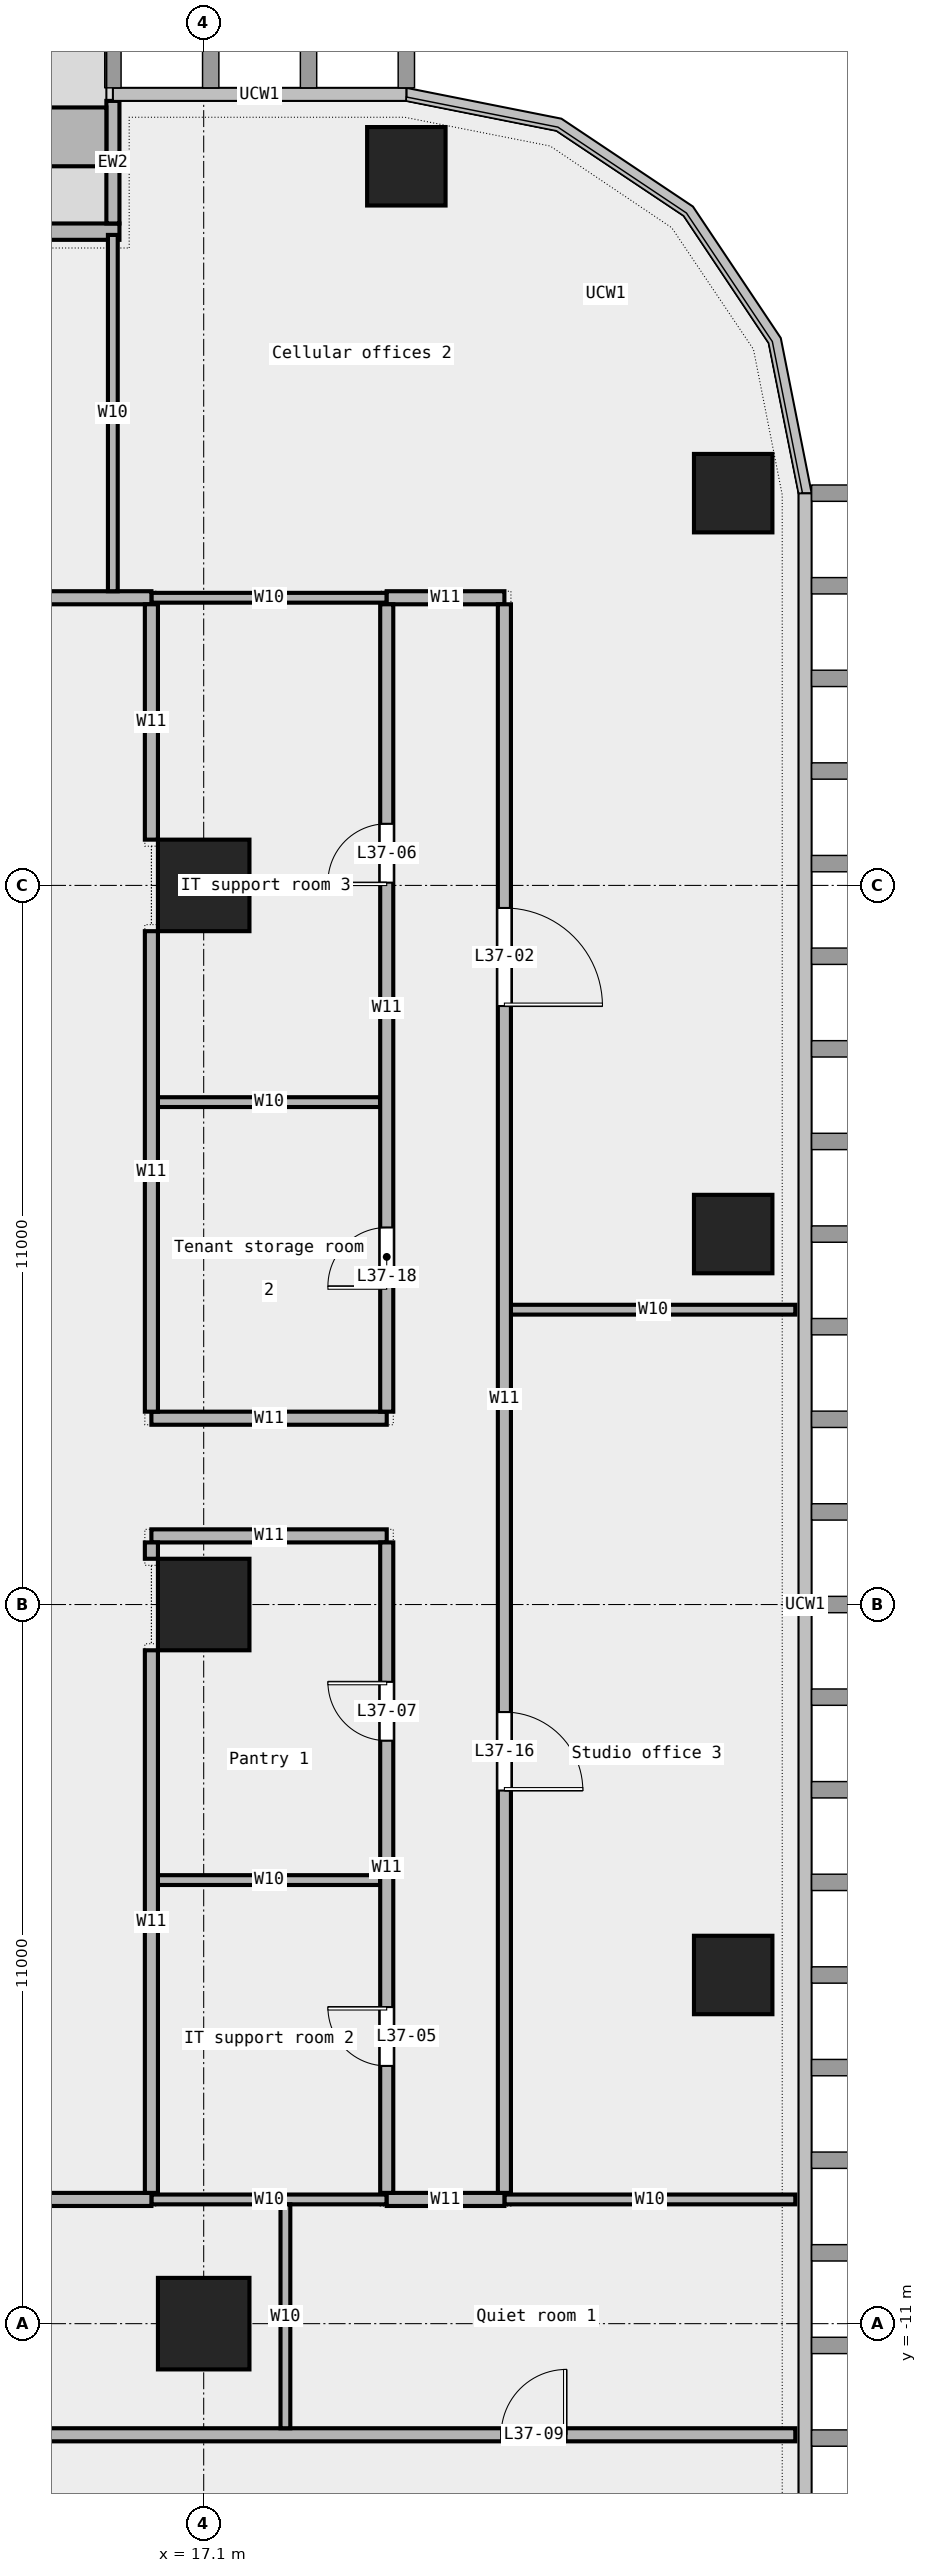
"""IFC4 building model, lengths in metres.
Left out: names, types, materials, properties, quantities, classifications, styles, units other than length and angle.
Written with IfcOpenShell. Run it as: python <this file> out.ifc"""

import sys

from ifc_helpers import new_model, si_unit, direction, frame, frame_2d, origin, origin_2d, place, context, subcontext, project, spatial, rectangle, extrude, element, fill, save


model = new_model("IFC4")
c1 = context("Model", 3, precision=1e-05, world=origin(), true_north=direction((0.0, 1.0)))
c2 = subcontext(c1, "Body", "Model", "MODEL_VIEW")
j1 = project(units=[si_unit("LENGTHUNIT", "METRE"), si_unit("PLANEANGLEUNIT", "RADIAN")], contexts=[c1])
p1 = place(None, origin())
s1 = spatial("IfcSite", under=j1, at=p1, CompositionType="ELEMENT")
p2 = place(p1, origin())
s2 = spatial("IfcBuilding", under=s1, at=p2, CompositionType="ELEMENT")
p3 = place(p2, frame((0.0, 0.0, 181.0)))
s3 = spatial("IfcBuildingStorey", under=s2, at=p3, CompositionType="ELEMENT", Elevation=181.0)
for number, where, z_axis, x_axis in (
    (1, (25.2, -5.667, 0.0), (0.0, 0.0, 1.0), (1.0, 0.0, 0.0)),
    (2, (25.2, 5.667, 0.0), (0.0, 0.0, 1.0), (1.0, 0.0, 0.0)),
    (3, (25.2, 17.0, 0.0), (0.0, 0.0, 1.0), (1.0, 0.0, 0.0)),
    (4, (20.2, 22.0, 0.0), (0.0, 0.0, 1.0), (1.0, 0.0, 0.0)),
):
    element("IfcColumn", number, at=place(p3, frame(where, z_axis=z_axis, x_axis=x_axis)), inside=s3, PredefinedType="COLUMN", context=c2, shape_type="SweptSolid", body=[
        extrude(rectangle(XDim=1.2, YDim=1.2, at=origin_2d()), origin(), (0.0, 0.0, 1.0), 3.6),
    ])
for number, where, z_axis, x_axis in (
    (5, (17.1, -11.0, 0.0), (0.0, 0.0, 1.0), (1.0, 0.0, 0.0)),
    (6, (17.1, 0.0, 0.0), (0.0, 0.0, 1.0), (1.0, 0.0, 0.0)),
    (7, (17.1, 11.0, 0.0), (0.0, 0.0, 1.0), (1.0, 0.0, 0.0)),
):
    element("IfcColumn", number, at=place(p3, frame(where, z_axis=z_axis, x_axis=x_axis)), inside=s3, PredefinedType="COLUMN", context=c2, shape_type="SweptSolid", body=[
        extrude(rectangle(XDim=1.4, YDim=1.4, at=origin_2d()), origin(), (0.0, 0.0, 1.0), 3.6),
    ])
p4 = place(p3, frame((15.811, 21.0, 0.0), z_axis=(0.0, 0.0, 1.0), x_axis=(-1.0, 0.0, 0.0)))
e8 = element("IfcWall", 8, at=p4, inside=s3, PredefinedType="STANDARD", context=c2, shape_type="SweptSolid", body=[
    extrude(rectangle(XDim=13.667, YDim=0.25, at=frame_2d((6.833, 0.0))), origin(), (0.0, 0.0, 1.0), 3.6),
])
p5 = place(p4, frame((1.75, 0.0, 0.45)))
e9 = element("IfcOpeningElement", 9, at=p5, cuts=e8, PredefinedType="OPENING", context=c2, shape_type="SweptSolid", body=[
    extrude(rectangle(XDim=1.5, YDim=2.4, at=frame_2d((0.75, 1.2))), frame((0.0, 0.137, 0.0), z_axis=(0.0, -1.0, 0.0), x_axis=(1.0, 0.0, 0.0)), (0.0, 0.0, 1.0), 0.274),
])
p6 = place(p4, frame((6.75, 0.0, 0.0)))
e10 = element("IfcOpeningElement", 10, at=p6, cuts=e8, PredefinedType="OPENING", context=c2, shape_type="SweptSolid", body=[
    extrude(rectangle(XDim=1.8, YDim=2.4, at=frame_2d((0.9, 1.2))), frame((0.0, 0.137, 0.0), z_axis=(0.0, -1.0, 0.0), x_axis=(1.0, 0.0, 0.0)), (0.0, 0.0, 1.0), 0.274),
])
p7 = place(p4, frame((10.5, 0.0, 0.45)))
e11 = element("IfcOpeningElement", 11, at=p7, cuts=e8, PredefinedType="OPENING", context=c2, shape_type="SweptSolid", body=[
    extrude(rectangle(XDim=1.5, YDim=2.4, at=frame_2d((0.75, 1.2))), frame((0.0, 0.137, 0.0), z_axis=(0.0, -1.0, 0.0), x_axis=(1.0, 0.0, 0.0)), (0.0, 0.0, 1.0), 0.274),
])
p8 = place(p3, frame((15.711, 23.0, 0.0), z_axis=(0.0, 0.0, 1.0), x_axis=(0.0, -1.0, 0.0)))
e12 = element("IfcWall", 12, at=p8, inside=s3, PredefinedType="STANDARD", context=c2, shape_type="SweptSolid", body=[
    extrude(rectangle(XDim=1.875, YDim=0.2, at=frame_2d((0.938, 0.0))), origin(), (0.0, 0.0, 1.0), 3.6),
])
p9 = place(p3, frame((15.611, 22.45, 0.0), z_axis=(0.0, 0.0, 1.0), x_axis=(-1.0, 0.0, 0.0)))
e13 = element("IfcWall", 13, at=p9, inside=s3, PredefinedType="STANDARD", context=c2, shape_type="SweptSolid", body=[
    extrude(rectangle(XDim=3.6, YDim=0.9, at=frame_2d((1.8, 0.0))), origin(), (0.0, 0.0, 1.0), 0.7),
])
p10 = place(p3, frame((0.9, -12.7, 0.0), z_axis=(0.0, 0.0, 1.0), x_axis=(1.0, 0.0, 0.0)))
e14 = element("IfcWall", 14, at=p10, inside=s3, PredefinedType="PARTITIONING", context=c2, shape_type="SweptSolid", body=[
    extrude(rectangle(XDim=25.25, YDim=0.2, at=frame_2d((12.625, 0.0))), origin(), (0.0, 0.0, 1.0), 3.6),
])
p11 = place(p10, frame((20.75, 0.0, 0.0)))
e15 = element("IfcOpeningElement", 15, at=p11, cuts=e14, PredefinedType="OPENING", context=c2, shape_type="SweptSolid", body=[
    extrude(rectangle(XDim=1.0, YDim=2.1, at=frame_2d((0.5, 1.05))), frame((0.0, 0.112, 0.0), z_axis=(0.0, -1.0, 0.0), x_axis=(1.0, 0.0, 0.0)), (0.0, 0.0, 1.0), 0.224),
])
p12 = place(p10, frame((8.125, 0.0, 0.0)))
e16 = element("IfcOpeningElement", 16, at=p12, cuts=e14, PredefinedType="OPENING", context=c2, shape_type="SweptSolid", body=[
    extrude(rectangle(XDim=1.2, YDim=2.1, at=frame_2d((0.6, 1.05))), frame((0.0, 0.112, 0.0), z_axis=(0.0, -1.0, 0.0), x_axis=(1.0, 0.0, 0.0)), (0.0, 0.0, 1.0), 0.224),
])
p13 = place(p3, frame((16.3, -9.1, 0.0), z_axis=(0.0, 0.0, 1.0), x_axis=(1.0, 0.0, 0.0)))
e17 = element("IfcWall", 17, at=p13, inside=s3, PredefinedType="PARTITIONING", context=c2, shape_type="SweptSolid", body=[
    extrude(rectangle(XDim=3.6, YDim=0.15, at=frame_2d((1.8, 0.0))), origin(), (0.0, 0.0, 1.0), 3.6),
])
p14 = place(p3, frame((21.7, -9.1, 0.0), z_axis=(0.0, 0.0, 1.0), x_axis=(1.0, 0.0, 0.0)))
e18 = element("IfcWall", 18, at=p14, inside=s3, PredefinedType="PARTITIONING", context=c2, shape_type="SweptSolid", body=[
    extrude(rectangle(XDim=4.45, YDim=0.15, at=frame_2d((2.225, 0.0))), origin(), (0.0, 0.0, 1.0), 3.6),
])
p15 = place(p3, frame((0.9, -9.1, 0.0), z_axis=(0.0, 0.0, 1.0), x_axis=(1.0, 0.0, 0.0)))
e19 = element("IfcWall", 19, at=p15, inside=s3, PredefinedType="PARTITIONING", context=c2, shape_type="SweptSolid", body=[
    extrude(rectangle(XDim=15.4, YDim=0.2, at=frame_2d((7.7, 0.0))), origin(), (0.0, 0.0, 1.0), 3.6),
])
p16 = place(p3, frame((19.9, -9.1, 0.0), z_axis=(0.0, 0.0, 1.0), x_axis=(1.0, 0.0, 0.0)))
e20 = element("IfcWall", 20, at=p16, inside=s3, PredefinedType="PARTITIONING", context=c2, shape_type="SweptSolid", body=[
    extrude(rectangle(XDim=1.8, YDim=0.2, at=frame_2d((0.9, 0.0))), origin(), (0.0, 0.0, 1.0), 3.6),
])
p17 = place(p3, frame((16.4, -4.215, 0.0), z_axis=(0.0, 0.0, 1.0), x_axis=(1.0, 0.0, 0.0)))
e21 = element("IfcWall", 21, at=p17, inside=s3, PredefinedType="PARTITIONING", context=c2, shape_type="SweptSolid", body=[
    extrude(rectangle(XDim=3.4, YDim=0.15, at=frame_2d((1.7, 0.0))), origin(), (0.0, 0.0, 1.0), 3.6),
])
for number, where, z_axis, x_axis in (
    (22, (16.3, 1.05, 0.0), (0.0, 0.0, 1.0), (1.0, 0.0, 0.0)),
    (23, (16.3, 2.85, 0.0), (0.0, 0.0, 1.0), (1.0, 0.0, 0.0)),
):
    element("IfcWall", number, at=place(p3, frame(where, z_axis=z_axis, x_axis=x_axis)), inside=s3, PredefinedType="PARTITIONING", context=c2, shape_type="SweptSolid", body=[
        extrude(rectangle(XDim=3.6, YDim=0.2, at=frame_2d((1.8, 0.0))), origin(), (0.0, 0.0, 1.0), 3.6),
    ])
p18 = place(p3, frame((21.8, 4.51, 0.0), z_axis=(0.0, 0.0, 1.0), x_axis=(1.0, 0.0, 0.0)))
e24 = element("IfcWall", 24, at=p18, inside=s3, PredefinedType="PARTITIONING", context=c2, shape_type="SweptSolid", body=[
    extrude(rectangle(XDim=4.35, YDim=0.15, at=frame_2d((2.175, 0.0))), origin(), (0.0, 0.0, 1.0), 3.6),
])
p19 = place(p3, frame((16.4, 7.685, 0.0), z_axis=(0.0, 0.0, 1.0), x_axis=(1.0, 0.0, 0.0)))
e25 = element("IfcWall", 25, at=p19, inside=s3, PredefinedType="PARTITIONING", context=c2, shape_type="SweptSolid", body=[
    extrude(rectangle(XDim=3.4, YDim=0.15, at=frame_2d((1.7, 0.0))), origin(), (0.0, 0.0, 1.0), 3.6),
])
p20 = place(p3, frame((16.3, 15.4, 0.0), z_axis=(0.0, 0.0, 1.0), x_axis=(1.0, 0.0, 0.0)))
e26 = element("IfcWall", 26, at=p20, inside=s3, PredefinedType="PARTITIONING", context=c2, shape_type="SweptSolid", body=[
    extrude(rectangle(XDim=3.6, YDim=0.15, at=frame_2d((1.8, 0.0))), origin(), (0.0, 0.0, 1.0), 3.6),
])
p21 = place(p3, frame((-16.3, 15.4, 0.0), z_axis=(0.0, 0.0, 1.0), x_axis=(1.0, 0.0, 0.0)))
e27 = element("IfcWall", 27, at=p21, inside=s3, PredefinedType="PARTITIONING", context=c2, shape_type="SweptSolid", body=[
    extrude(rectangle(XDim=32.6, YDim=0.2, at=frame_2d((16.3, 0.0))), origin(), (0.0, 0.0, 1.0), 3.6),
])
p22 = place(p21, frame((24.677, 0.0, 0.0)))
e28 = element("IfcOpeningElement", 28, at=p22, cuts=e27, PredefinedType="OPENING", context=c2, shape_type="SweptSolid", body=[
    extrude(rectangle(XDim=1.2, YDim=2.1, at=frame_2d((0.6, 1.05))), frame((0.0, 0.112, 0.0), z_axis=(0.0, -1.0, 0.0), x_axis=(1.0, 0.0, 0.0)), (0.0, 0.0, 1.0), 0.224),
])
p23 = place(p21, frame((4.805, 0.0, 0.0)))
e29 = element("IfcOpeningElement", 29, at=p23, cuts=e27, PredefinedType="OPENING", context=c2, shape_type="SweptSolid", body=[
    extrude(rectangle(XDim=1.5, YDim=2.1, at=frame_2d((0.75, 1.05))), frame((0.0, 0.112, 0.0), z_axis=(0.0, -1.0, 0.0), x_axis=(1.0, 0.0, 0.0)), (0.0, 0.0, 1.0), 0.224),
])
p24 = place(p21, frame((14.228, 0.0, 0.0)))
e30 = element("IfcOpeningElement", 30, at=p24, cuts=e27, PredefinedType="OPENING", context=c2, shape_type="SweptSolid", body=[
    extrude(rectangle(XDim=1.2, YDim=2.1, at=frame_2d((0.6, 1.05))), frame((0.0, 0.112, 0.0), z_axis=(0.0, -1.0, 0.0), x_axis=(1.0, 0.0, 0.0)), (0.0, 0.0, 1.0), 0.224),
])
p25 = place(p3, frame((19.9, 15.4, 0.0), z_axis=(0.0, 0.0, 1.0), x_axis=(1.0, 0.0, 0.0)))
e31 = element("IfcWall", 31, at=p25, inside=s3, PredefinedType="PARTITIONING", context=c2, shape_type="SweptSolid", body=[
    extrude(rectangle(XDim=1.8, YDim=0.2, at=frame_2d((0.9, 0.0))), origin(), (0.0, 0.0, 1.0), 3.6),
])
p26 = place(p3, frame((15.71, 15.5, 0.0), z_axis=(0.0, 0.0, 1.0), x_axis=(0.0, 1.0, 0.0)))
e32 = element("IfcWall", 32, at=p26, inside=s3, PredefinedType="PARTITIONING", context=c2, shape_type="SweptSolid", body=[
    extrude(rectangle(XDim=5.45, YDim=0.15, at=frame_2d((2.725, 0.0))), origin(), (0.0, 0.0, 1.0), 3.6),
])
p27 = place(p3, frame((16.3, -9.0, 0.0), z_axis=(0.0, 0.0, 1.0), x_axis=(0.0, 1.0, 0.0)))
e33 = element("IfcWall", 33, at=p27, inside=s3, PredefinedType="PARTITIONING", context=c2, shape_type="SweptSolid", body=[
    extrude(rectangle(XDim=8.3, YDim=0.2, at=frame_2d((4.15, 0.0))), origin(), (0.0, 0.0, 1.0), 3.6),
])
p28 = place(p3, frame((16.3, 0.7, 0.0), z_axis=(0.0, 0.0, 1.0), x_axis=(0.0, 1.0, 0.0)))
e34 = element("IfcWall", 34, at=p28, inside=s3, PredefinedType="PARTITIONING", context=c2, shape_type="SweptSolid", body=[
    extrude(rectangle(XDim=0.25, YDim=0.2, at=frame_2d((0.125, 0.0))), origin(), (0.0, 0.0, 1.0), 3.6),
])
p29 = place(p3, frame((16.3, 2.95, 0.0), z_axis=(0.0, 0.0, 1.0), x_axis=(0.0, 1.0, 0.0)))
e35 = element("IfcWall", 35, at=p29, inside=s3, PredefinedType="PARTITIONING", context=c2, shape_type="SweptSolid", body=[
    extrude(rectangle(XDim=7.35, YDim=0.2, at=frame_2d((3.675, 0.0))), origin(), (0.0, 0.0, 1.0), 3.6),
])
p30 = place(p3, frame((16.3, 11.7, 0.0), z_axis=(0.0, 0.0, 1.0), x_axis=(0.0, 1.0, 0.0)))
e36 = element("IfcWall", 36, at=p30, inside=s3, PredefinedType="PARTITIONING", context=c2, shape_type="SweptSolid", body=[
    extrude(rectangle(XDim=3.6, YDim=0.2, at=frame_2d((1.8, 0.0))), origin(), (0.0, 0.0, 1.0), 3.6),
])
p31 = place(p3, frame((18.35, -12.6, 0.0), z_axis=(0.0, 0.0, 1.0), x_axis=(0.0, 1.0, 0.0)))
e37 = element("IfcWall", 37, at=p31, inside=s3, PredefinedType="PARTITIONING", context=c2, shape_type="SweptSolid", body=[
    extrude(rectangle(XDim=3.425, YDim=0.15, at=frame_2d((1.712, 0.0))), origin(), (0.0, 0.0, 1.0), 3.6),
])
p32 = place(p3, frame((19.9, -9.0, 0.0), z_axis=(0.0, 0.0, 1.0), x_axis=(0.0, 1.0, 0.0)))
e38 = element("IfcWall", 38, at=p32, inside=s3, PredefinedType="PARTITIONING", context=c2, shape_type="SweptSolid", body=[
    extrude(rectangle(XDim=9.95, YDim=0.2, at=frame_2d((4.975, 0.0))), origin(), (0.0, 0.0, 1.0), 3.6),
])
p33 = place(p32, frame((1.942, 0.0, 0.0)))
e39 = element("IfcOpeningElement", 39, at=p33, cuts=e38, PredefinedType="OPENING", context=c2, shape_type="SweptSolid", body=[
    extrude(rectangle(XDim=0.9, YDim=2.1, at=frame_2d((0.45, 1.05))), frame((0.0, 0.112, 0.0), z_axis=(0.0, -1.0, 0.0), x_axis=(1.0, 0.0, 0.0)), (0.0, 0.0, 1.0), 0.224),
])
p34 = place(p32, frame((6.917, 0.0, 0.0)))
e40 = element("IfcOpeningElement", 40, at=p34, cuts=e38, PredefinedType="OPENING", context=c2, shape_type="SweptSolid", body=[
    extrude(rectangle(XDim=0.9, YDim=2.1, at=frame_2d((0.45, 1.05))), frame((0.0, 0.112, 0.0), z_axis=(0.0, -1.0, 0.0), x_axis=(1.0, 0.0, 0.0)), (0.0, 0.0, 1.0), 0.224),
])
p35 = place(p3, frame((19.9, 2.95, 0.0), z_axis=(0.0, 0.0, 1.0), x_axis=(0.0, 1.0, 0.0)))
e41 = element("IfcWall", 41, at=p35, inside=s3, PredefinedType="PARTITIONING", context=c2, shape_type="SweptSolid", body=[
    extrude(rectangle(XDim=12.35, YDim=0.2, at=frame_2d((6.175, 0.0))), origin(), (0.0, 0.0, 1.0), 3.6),
])
p36 = place(p35, frame((8.093, 0.0, 0.0)))
e42 = element("IfcOpeningElement", 42, at=p36, cuts=e41, PredefinedType="OPENING", context=c2, shape_type="SweptSolid", body=[
    extrude(rectangle(XDim=0.9, YDim=2.1, at=frame_2d((0.45, 1.05))), frame((0.0, 0.112, 0.0), z_axis=(0.0, -1.0, 0.0), x_axis=(1.0, 0.0, 0.0)), (0.0, 0.0, 1.0), 0.224),
])
p37 = place(p35, frame((1.917, 0.0, 0.0)))
e43 = element("IfcOpeningElement", 43, at=p37, cuts=e41, PredefinedType="OPENING", context=c2, shape_type="SweptSolid", body=[
    extrude(rectangle(XDim=0.9, YDim=2.1, at=frame_2d((0.45, 1.05))), frame((0.0, 0.112, 0.0), z_axis=(0.0, -1.0, 0.0), x_axis=(1.0, 0.0, 0.0)), (0.0, 0.0, 1.0), 0.224),
])
p38 = place(p3, frame((21.7, -9.0, 0.0), z_axis=(0.0, 0.0, 1.0), x_axis=(0.0, 1.0, 0.0)))
e44 = element("IfcWall", 44, at=p38, inside=s3, PredefinedType="PARTITIONING", context=c2, shape_type="SweptSolid", body=[
    extrude(rectangle(XDim=24.3, YDim=0.2, at=frame_2d((12.15, 0.0))), origin(), (0.0, 0.0, 1.0), 3.6),
])
p39 = place(p38, frame((18.155, 0.0, 0.0)))
e45 = element("IfcOpeningElement", 45, at=p39, cuts=e44, PredefinedType="OPENING", context=c2, shape_type="SweptSolid", body=[
    extrude(rectangle(XDim=1.5, YDim=2.1, at=frame_2d((0.75, 1.05))), frame((0.0, 0.112, 0.0), z_axis=(0.0, -1.0, 0.0), x_axis=(1.0, 0.0, 0.0)), (0.0, 0.0, 1.0), 0.224),
])
p40 = place(p38, frame((6.155, 0.0, 0.0)))
e46 = element("IfcOpeningElement", 46, at=p40, cuts=e44, PredefinedType="OPENING", context=c2, shape_type="SweptSolid", body=[
    extrude(rectangle(XDim=1.2, YDim=2.1, at=frame_2d((0.6, 1.05))), frame((0.0, 0.112, 0.0), z_axis=(0.0, -1.0, 0.0), x_axis=(1.0, 0.0, 0.0)), (0.0, 0.0, 1.0), 0.224),
])
p41 = place(p39, origin())
e47 = element("IfcDoor", 47, at=p41, inside=s3, OperationType="DOUBLE_DOOR_SINGLE_SWING", PredefinedType="DOOR", context=c2, shape_type="SweptSolid", body=[
    extrude(rectangle(XDim=1.5, YDim=2.1, at=frame_2d((0.75, 1.05))), frame((0.0, 0.025, 0.0), z_axis=(0.0, -1.0, 0.0), x_axis=(1.0, 0.0, 0.0)), (0.0, 0.0, 1.0), 0.05),
])
fill(e45, e47)
p42 = place(p33, origin())
e48 = element("IfcDoor", 48, at=p42, inside=s3, OperationType="SINGLE_SWING_RIGHT", PredefinedType="DOOR", context=c2, shape_type="SweptSolid", body=[
    extrude(rectangle(XDim=0.9, YDim=2.1, at=frame_2d((0.45, 1.05))), frame((0.0, 0.025, 0.0), z_axis=(0.0, -1.0, 0.0), x_axis=(1.0, 0.0, 0.0)), (0.0, 0.0, 1.0), 0.05),
])
fill(e39, e48)
p43 = place(p36, origin())
e49 = element("IfcDoor", 49, at=p43, inside=s3, OperationType="SINGLE_SWING_LEFT", PredefinedType="DOOR", context=c2, shape_type="SweptSolid", body=[
    extrude(rectangle(XDim=0.9, YDim=2.1, at=frame_2d((0.45, 1.05))), frame((0.0, 0.025, 0.0), z_axis=(0.0, -1.0, 0.0), x_axis=(1.0, 0.0, 0.0)), (0.0, 0.0, 1.0), 0.05),
])
fill(e42, e49)
p44 = place(p34, origin())
e50 = element("IfcDoor", 50, at=p44, inside=s3, OperationType="SINGLE_SWING_RIGHT", PredefinedType="DOOR", context=c2, shape_type="SweptSolid", body=[
    extrude(rectangle(XDim=0.9, YDim=2.1, at=frame_2d((0.45, 1.05))), frame((0.0, 0.025, 0.0), z_axis=(0.0, -1.0, 0.0), x_axis=(1.0, 0.0, 0.0)), (0.0, 0.0, 1.0), 0.05),
])
fill(e40, e50)
p45 = place(p11, origin())
e51 = element("IfcDoor", 51, at=p45, inside=s3, OperationType="SINGLE_SWING_RIGHT", PredefinedType="DOOR", context=c2, shape_type="SweptSolid", body=[
    extrude(rectangle(XDim=1.0, YDim=2.1, at=frame_2d((0.5, 1.05))), frame((0.0, 0.025, 0.0), z_axis=(0.0, -1.0, 0.0), x_axis=(1.0, 0.0, 0.0)), (0.0, 0.0, 1.0), 0.05),
])
fill(e15, e51)
p46 = place(p40, origin())
e52 = element("IfcDoor", 52, at=p46, inside=s3, OperationType="SINGLE_SWING_RIGHT", PredefinedType="DOOR", context=c2, shape_type="SweptSolid", body=[
    extrude(rectangle(XDim=1.2, YDim=2.1, at=frame_2d((0.6, 1.05))), frame((0.0, 0.025, 0.0), z_axis=(0.0, -1.0, 0.0), x_axis=(1.0, 0.0, 0.0)), (0.0, 0.0, 1.0), 0.05),
])
fill(e46, e52)
p47 = place(p37, origin())
e53 = element("IfcDoor", 53, at=p47, inside=s3, OperationType="SINGLE_SWING_LEFT", PredefinedType="DOOR", context=c2, shape_type="SweptSolid", body=[
    extrude(rectangle(XDim=0.9, YDim=2.1, at=frame_2d((0.45, 1.05))), frame((0.0, 0.025, 0.0), z_axis=(0.0, -1.0, 0.0), x_axis=(1.0, 0.0, 0.0)), (0.0, 0.0, 1.0), 0.05),
])
fill(e43, e53)
save(model, sys.argv[1])
